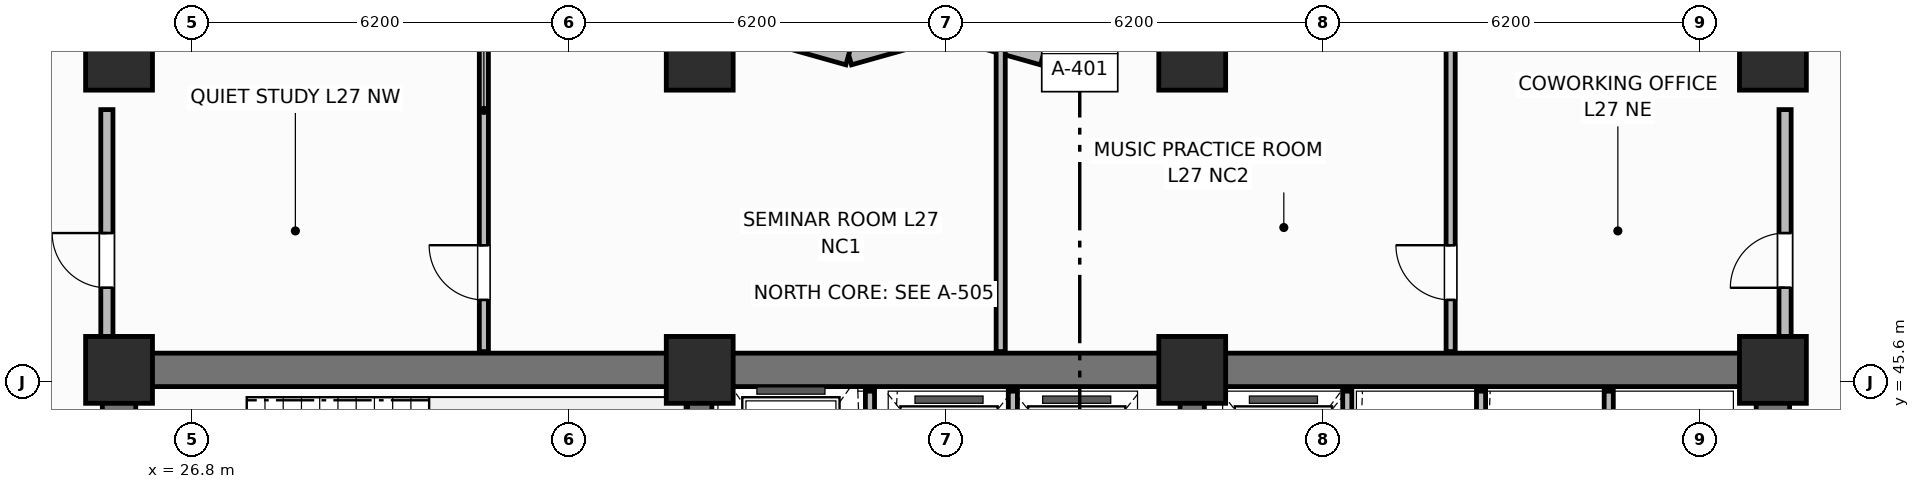
"""IFC4 building model, lengths in metres.
Left out: names, types, materials, properties, quantities, classifications, styles, units other than length and angle.
Written with IfcOpenShell. Run it as: python <this file> out.ifc"""

import sys

from ifc_helpers import new_model, si_unit, direction, frame, frame_2d, origin, origin_2d, place, context, subcontext, project, spatial, rectangle, extrude, element, fill, save


model = new_model("IFC4")
c1 = context("Model", 3, precision=1e-05, world=origin(), true_north=direction((0.0, 1.0)))
c2 = subcontext(c1, "Body", "Model", "MODEL_VIEW")
j1 = project(units=[si_unit("LENGTHUNIT", "METRE"), si_unit("PLANEANGLEUNIT", "RADIAN")], contexts=[c1])
p1 = place(None, origin())
s1 = spatial("IfcSite", under=j1, at=p1, CompositionType="ELEMENT")
p2 = place(p1, origin())
s2 = spatial("IfcBuilding", under=s1, at=p2, CompositionType="ELEMENT")
p3 = place(p2, frame((0.0, 0.0, 110.5)))
s3 = spatial("IfcBuildingStorey", under=s2, at=p3, CompositionType="ELEMENT", Elevation=110.5)
p4 = place(p3, frame((25.6, 45.8, 0.0), z_axis=(0.0, 0.0, 1.0), x_axis=(1.0, 0.0, 0.0)))
e1 = element("IfcWall", 1, at=p4, inside=s3, PredefinedType="SHEAR", context=c2, shape_type="SweptSolid", body=[
    extrude(rectangle(XDim=27.2, YDim=0.55, at=frame_2d((13.6, 0.0))), origin(), (0.0, 0.0, 1.0), 3.7),
])
for number, where, z_axis, x_axis in (
    (2, (25.6, 39.875, 0.0), (0.0, 0.0, 1.0), (0.0, 1.0, 0.0)),
    (3, (52.8, 39.875, 0.0), (0.0, 0.0, 1.0), (0.0, 1.0, 0.0)),
):
    element("IfcWall", number, at=place(p3, frame(where, z_axis=z_axis, x_axis=x_axis)), inside=s3, PredefinedType="SHEAR", context=c2, shape_type="SweptSolid", body=[
        extrude(rectangle(XDim=5.65, YDim=0.55, at=frame_2d((2.825, 0.0))), origin(), (0.0, 0.0, 1.0), 3.7),
    ])
for number, where, z_axis, x_axis in (
    (4, (35.15, 39.875, 0.0), (0.0, 0.0, 1.0), (0.0, 1.0, 0.0)),
    (5, (43.25, 39.875, 0.0), (0.0, 0.0, 1.0), (0.0, 1.0, 0.0)),
):
    element("IfcWall", number, at=place(p3, frame(where, z_axis=z_axis, x_axis=x_axis)), inside=s3, PredefinedType="SHEAR", context=c2, shape_type="SweptSolid", body=[
        extrude(rectangle(XDim=5.65, YDim=0.4, at=frame_2d((2.825, 0.0))), origin(), (0.0, 0.0, 1.0), 3.7),
    ])
for number, where, z_axis, x_axis in (
    (6, (25.6, 45.8, 0.0), (0.0, 0.0, 1.0), (1.0, 0.0, 0.0)),
    (7, (35.15, 45.8, 0.0), (0.0, 0.0, 1.0), (1.0, 0.0, 0.0)),
    (8, (43.25, 45.8, 0.0), (0.0, 0.0, 1.0), (1.0, 0.0, 0.0)),
    (9, (52.8, 45.8, 0.0), (0.0, 0.0, 1.0), (1.0, 0.0, 0.0)),
    (10, (25.6, 50.95, 0.0), (0.0, 0.0, 1.0), (1.0, 0.0, 0.0)),
    (11, (35.15, 50.95, 0.0), (0.0, 0.0, 1.0), (1.0, 0.0, 0.0)),
    (12, (43.25, 50.95, 0.0), (0.0, 0.0, 1.0), (1.0, 0.0, 0.0)),
    (13, (52.8, 50.95, 0.0), (0.0, 0.0, 1.0), (1.0, 0.0, 0.0)),
):
    element("IfcColumn", number, at=place(p3, frame(where, z_axis=z_axis, x_axis=x_axis)), inside=s3, PredefinedType="COLUMN", context=c2, shape_type="SweptSolid", body=[
        extrude(rectangle(XDim=1.1, YDim=1.1, at=origin_2d()), origin(), (0.0, 0.0, 1.0), 3.7),
    ])
p5 = place(p3, frame((42.4, 51.43, 0.0), z_axis=(0.0, 0.0, 1.0), x_axis=(-0.962652136636, -0.270741322725, 0.0)))
e14 = element("IfcWall", 14, at=p5, inside=s3, PredefinedType="SOLIDWALL", context=c2, shape_type="SweptSolid", body=[
    extrude(rectangle(XDim=1.662, YDim=0.34, at=frame_2d((0.831, 0.0))), origin(), (0.0, 0.0, 1.0), 2.7),
])
p6 = place(p3, frame((40.8, 50.98, 0.0), z_axis=(0.0, 0.0, 1.0), x_axis=(-0.962662902433, 0.270703040766, 0.0)))
e15 = element("IfcWall", 15, at=p6, inside=s3, PredefinedType="SOLIDWALL", context=c2, shape_type="SweptSolid", body=[
    extrude(rectangle(XDim=1.662, YDim=0.34, at=frame_2d((0.831, 0.0))), origin(), (0.0, 0.0, 1.0), 2.7),
])
p7 = place(p3, frame((39.2, 51.43, 0.0), z_axis=(0.0, 0.0, 1.0), x_axis=(-0.962652136636, -0.270741322725, 0.0)))
e16 = element("IfcWall", 16, at=p7, inside=s3, PredefinedType="SOLIDWALL", context=c2, shape_type="SweptSolid", body=[
    extrude(rectangle(XDim=1.662, YDim=0.34, at=frame_2d((0.831, 0.0))), origin(), (0.0, 0.0, 1.0), 2.7),
])
p8 = place(p3, frame((37.6, 50.98, 0.0), z_axis=(0.0, 0.0, 1.0), x_axis=(-0.962662902433, 0.270703040766, 0.0)))
e17 = element("IfcWall", 17, at=p8, inside=s3, PredefinedType="SOLIDWALL", context=c2, shape_type="SweptSolid", body=[
    extrude(rectangle(XDim=1.662, YDim=0.34, at=frame_2d((0.831, 0.0))), origin(), (0.0, 0.0, 1.0), 2.7),
])
p9 = place(p3, frame((37.95, 42.6, 0.0), z_axis=(0.0, 0.0, 1.0), x_axis=(0.0, 1.0, 0.0)))
e18 = element("IfcWall", 18, at=p9, inside=s3, PredefinedType="PARTITIONING", context=c2, shape_type="SweptSolid", body=[
    extrude(rectangle(XDim=2.85, YDim=0.15, at=frame_2d((1.425, 0.0))), origin(), (0.0, 0.0, 1.0), 2.53),
])
for number, where, z_axis, x_axis in (
    (19, (40.3, 42.65, 0.0), (0.0, 0.0, 1.0), (0.0, 1.0, 0.0)),
    (20, (45.8, 42.65, 0.0), (0.0, 0.0, 1.0), (0.0, 1.0, 0.0)),
    (21, (48.0, 42.65, 0.0), (0.0, 0.0, 1.0), (0.0, 1.0, 0.0)),
    (22, (50.1, 42.65, 0.0), (0.0, 0.0, 1.0), (0.0, 1.0, 0.0)),
):
    element("IfcWall", number, at=place(p3, frame(where, z_axis=z_axis, x_axis=x_axis)), inside=s3, PredefinedType="PARTITIONING", context=c2, shape_type="SweptSolid", body=[
        extrude(rectangle(XDim=2.8, YDim=0.15, at=frame_2d((1.4, 0.0))), origin(), (0.0, 0.0, 1.0), 2.53),
    ])
p10 = place(p3, frame((31.6, 46.1, 0.0), z_axis=(0.0, 0.0, 1.0), x_axis=(0.0, 1.0, 0.0)))
e23 = element("IfcWall", 23, at=p10, inside=s3, PredefinedType="PARTITIONING", context=c2, shape_type="SweptSolid", body=[
    extrude(rectangle(XDim=5.33, YDim=0.15, at=frame_2d((2.665, 0.0))), origin(), (0.0, 0.0, 1.0), 2.53),
])
p11 = place(p10, frame((0.85, 0.0, 0.0)))
e24 = element("IfcOpeningElement", 24, at=p11, cuts=e23, PredefinedType="OPENING", context=c2, shape_type="SweptSolid", body=[
    extrude(rectangle(XDim=0.9, YDim=2.1, at=frame_2d((0.45, 1.05))), frame((0.0, 0.085, 0.0), z_axis=(0.0, -1.0, 0.0), x_axis=(1.0, 0.0, 0.0)), (0.0, 0.0, 1.0), 0.17),
])
p12 = place(p3, frame((40.1, 46.1, 0.0), z_axis=(0.0, 0.0, 1.0), x_axis=(0.0, 1.0, 0.0)))
e25 = element("IfcWall", 25, at=p12, inside=s3, PredefinedType="PARTITIONING", context=c2, shape_type="SweptSolid", body=[
    extrude(rectangle(XDim=5.33, YDim=0.15, at=frame_2d((2.665, 0.0))), origin(), (0.0, 0.0, 1.0), 2.53),
])
p13 = place(p3, frame((47.5, 46.1, 0.0), z_axis=(0.0, 0.0, 1.0), x_axis=(0.0, 1.0, 0.0)))
e26 = element("IfcWall", 26, at=p13, inside=s3, PredefinedType="PARTITIONING", context=c2, shape_type="SweptSolid", body=[
    extrude(rectangle(XDim=5.33, YDim=0.15, at=frame_2d((2.665, 0.0))), origin(), (0.0, 0.0, 1.0), 2.53),
])
p14 = place(p13, frame((0.85, 0.0, 0.0)))
e27 = element("IfcOpeningElement", 27, at=p14, cuts=e26, PredefinedType="OPENING", context=c2, shape_type="SweptSolid", body=[
    extrude(rectangle(XDim=0.9, YDim=2.1, at=frame_2d((0.45, 1.05))), frame((0.0, 0.085, 0.0), z_axis=(0.0, -1.0, 0.0), x_axis=(1.0, 0.0, 0.0)), (0.0, 0.0, 1.0), 0.17),
])
p15 = place(p3, frame((25.4, 46.1, 0.0), z_axis=(0.0, 0.0, 1.0), x_axis=(0.0, 1.0, 0.0)))
e28 = element("IfcWall", 28, at=p15, inside=s3, PredefinedType="PARTITIONING", context=c2, shape_type="SweptSolid", body=[
    extrude(rectangle(XDim=3.98, YDim=0.2, at=frame_2d((1.99, 0.0))), origin(), (0.0, 0.0, 1.0), 2.53),
])
p16 = place(p15, frame((1.05, 0.0, 0.0)))
e29 = element("IfcOpeningElement", 29, at=p16, cuts=e28, PredefinedType="OPENING", context=c2, shape_type="SweptSolid", body=[
    extrude(rectangle(XDim=0.9, YDim=2.1, at=frame_2d((0.45, 1.05))), frame((0.0, 0.11, 0.0), z_axis=(0.0, -1.0, 0.0), x_axis=(1.0, 0.0, 0.0)), (0.0, 0.0, 1.0), 0.22),
])
p17 = place(p3, frame((53.0, 46.1, 0.0), z_axis=(0.0, 0.0, 1.0), x_axis=(0.0, 1.0, 0.0)))
e30 = element("IfcWall", 30, at=p17, inside=s3, PredefinedType="PARTITIONING", context=c2, shape_type="SweptSolid", body=[
    extrude(rectangle(XDim=3.98, YDim=0.2, at=frame_2d((1.99, 0.0))), origin(), (0.0, 0.0, 1.0), 2.53),
])
p18 = place(p17, frame((1.05, 0.0, 0.0)))
e31 = element("IfcOpeningElement", 31, at=p18, cuts=e30, PredefinedType="OPENING", context=c2, shape_type="SweptSolid", body=[
    extrude(rectangle(XDim=0.9, YDim=2.1, at=frame_2d((0.45, 1.05))), frame((0.0, 0.11, 0.0), z_axis=(0.0, -1.0, 0.0), x_axis=(1.0, 0.0, 0.0)), (0.0, 0.0, 1.0), 0.22),
])
p19 = place(p11, origin())
e32 = element("IfcDoor", 32, at=p19, inside=s3, OperationType="SINGLE_SWING_RIGHT", PredefinedType="DOOR", context=c2, shape_type="SweptSolid", body=[
    extrude(rectangle(XDim=0.9, YDim=2.1, at=frame_2d((0.45, 1.05))), frame((0.0, 0.025, 0.0), z_axis=(0.0, -1.0, 0.0), x_axis=(1.0, 0.0, 0.0)), (0.0, 0.0, 1.0), 0.05),
])
fill(e24, e32)
p20 = place(p14, origin())
e33 = element("IfcDoor", 33, at=p20, inside=s3, OperationType="SINGLE_SWING_RIGHT", PredefinedType="DOOR", context=c2, shape_type="SweptSolid", body=[
    extrude(rectangle(XDim=0.9, YDim=2.1, at=frame_2d((0.45, 1.05))), frame((0.0, 0.025, 0.0), z_axis=(0.0, -1.0, 0.0), x_axis=(1.0, 0.0, 0.0)), (0.0, 0.0, 1.0), 0.05),
])
fill(e27, e33)
p21 = place(p16, origin())
e34 = element("IfcDoor", 34, at=p21, inside=s3, OperationType="SINGLE_SWING_RIGHT", PredefinedType="DOOR", context=c2, shape_type="SweptSolid", body=[
    extrude(rectangle(XDim=0.9, YDim=2.1, at=frame_2d((0.45, 1.05))), frame((0.0, 0.025, 0.0), z_axis=(0.0, -1.0, 0.0), x_axis=(1.0, 0.0, 0.0)), (0.0, 0.0, 1.0), 0.05),
])
fill(e29, e34)
p22 = place(p18, origin())
e35 = element("IfcDoor", 35, at=p22, inside=s3, OperationType="SINGLE_SWING_LEFT", PredefinedType="DOOR", context=c2, shape_type="SweptSolid", body=[
    extrude(rectangle(XDim=0.9, YDim=2.1, at=frame_2d((0.45, 1.05))), frame((0.0, 0.025, 0.0), z_axis=(0.0, -1.0, 0.0), x_axis=(1.0, 0.0, 0.0)), (0.0, 0.0, 1.0), 0.05),
])
fill(e31, e35)
save(model, sys.argv[1])
